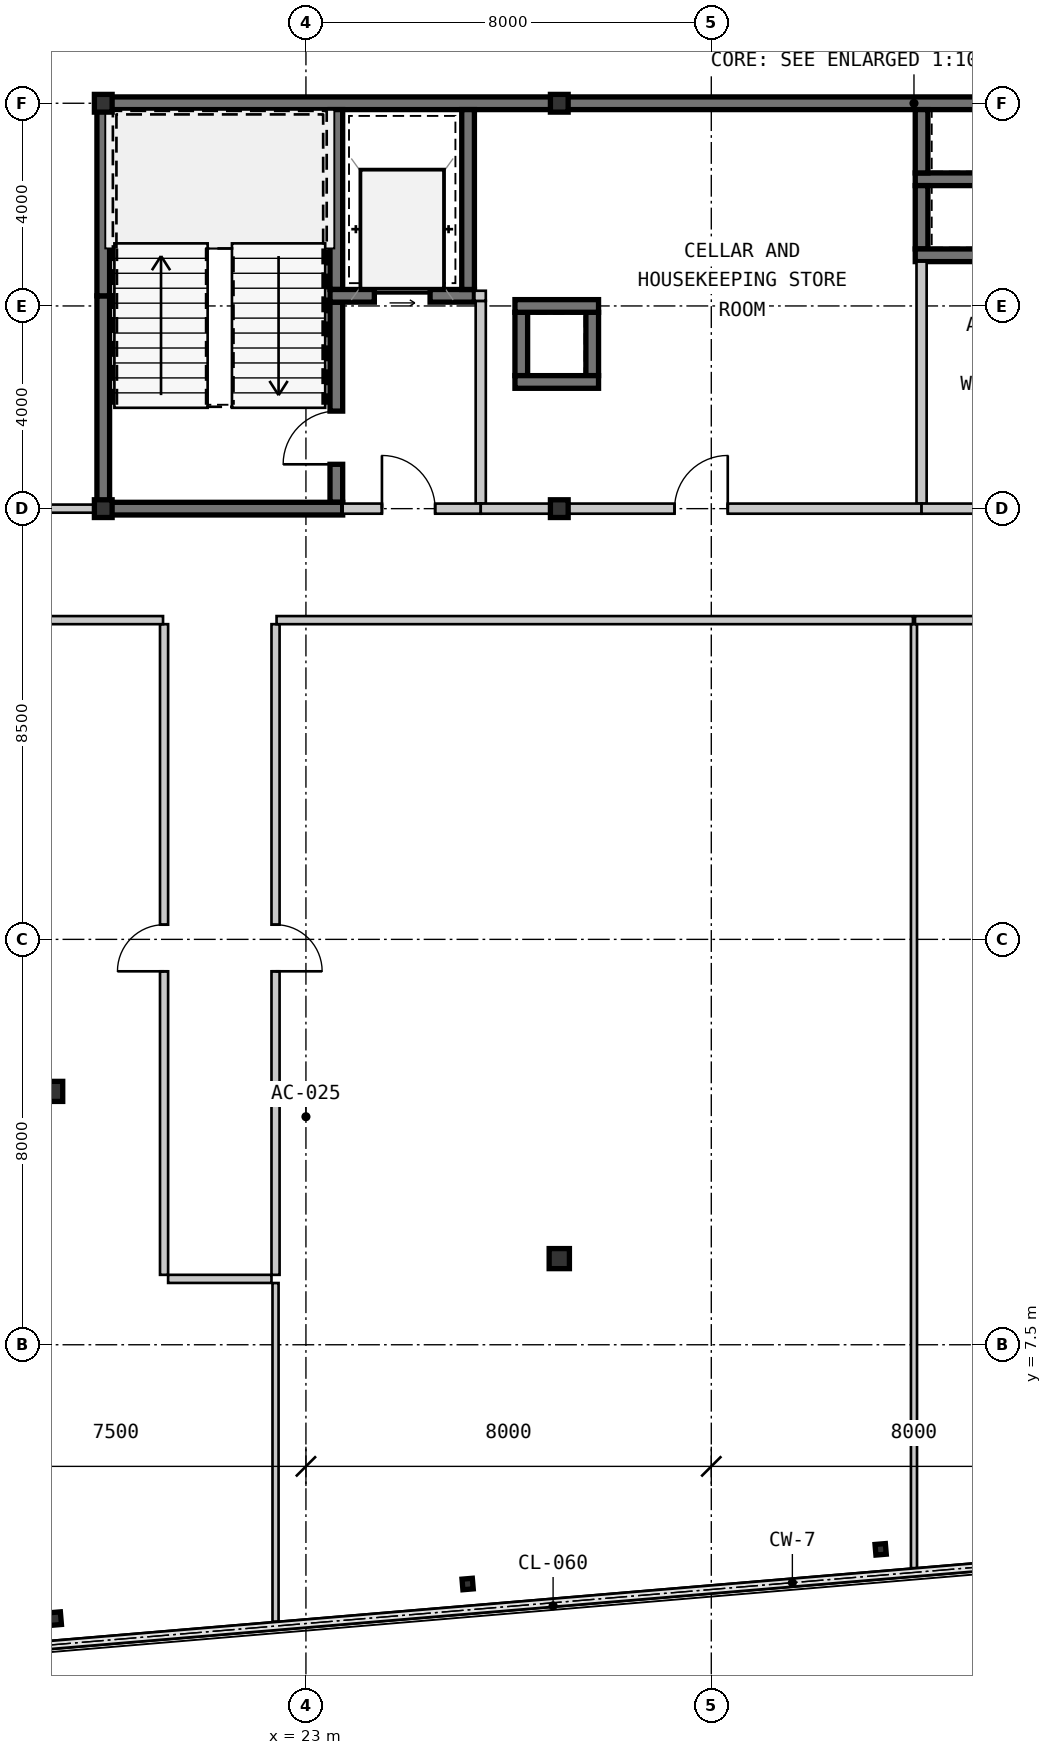
"""IFC4 building model, lengths in metres.
Left out: names, types, materials, properties, quantities, classifications, styles, units other than length and angle.
Written with IfcOpenShell. Run it as: python <this file> out.ifc"""

import sys

from ifc_helpers import new_model, si_unit, direction, frame, frame_2d, origin, origin_2d, place, context, subcontext, project, spatial, rectangle, hollow_rectangle, i_section, extrude, source, transform, mapped, element, fill, save


model = new_model("IFC4")
c1 = context("Model", 3, precision=1e-05, world=origin(), true_north=direction((0.0, 1.0)))
c2 = subcontext(c1, "Body", "Model", "MODEL_VIEW")
j1 = project(units=[si_unit("LENGTHUNIT", "METRE"), si_unit("PLANEANGLEUNIT", "RADIAN")], contexts=[c1])
p1 = place(None, origin())
s1 = spatial("IfcSite", under=j1, at=p1, CompositionType="ELEMENT")
p2 = place(p1, origin())
s2 = spatial("IfcBuilding", under=s1, at=p2, CompositionType="ELEMENT")
p3 = place(p2, frame((0.0, 0.0, 168.7)))
s3 = spatial("IfcBuildingStorey", under=s2, at=p3, CompositionType="ELEMENT", Elevation=168.7)
m1 = source(origin(), c2, "Body", "SweptSolid", [
    extrude(hollow_rectangle(XDim=0.35, YDim=0.35, WallThickness=0.016, at=origin_2d()), origin(), (0.0, 0.0, 1.0), 3.85),
])
for number, where, z_axis, x_axis in (
    (1, (19.0, 24.0, 0.0), (0.0, 0.0, 1.0), (1.0, 0.0, 0.0)),
    (2, (28.0, 24.0, 0.0), (0.0, 0.0, 1.0), (1.0, 0.0, 0.0)),
    (3, (19.0, 32.0, 0.0), (0.0, 0.0, 1.0), (1.0, 0.0, 0.0)),
    (4, (28.0, 32.0, 0.0), (0.0, 0.0, 1.0), (1.0, 0.0, 0.0)),
):
    element("IfcColumn", number, at=place(p3, frame(where, z_axis=z_axis, x_axis=x_axis)), inside=s3, PredefinedType="COLUMN", context=c2, shape_type="MappedRepresentation", body=[
        mapped(m1, transform((0.0, 0.0, 0.0), scale=1.0)),
    ])
m2 = source(origin(), c2, "Body", "SweptSolid", [
    extrude(i_section(OverallWidth=0.4, OverallDepth=0.396, WebThickness=0.022, FlangeThickness=0.034, at=origin_2d()), origin(), (0.0, 0.0, 1.0), 3.85),
])
for number, where, z_axis, x_axis in (
    (5, (28.0, 9.2, 0.0), (0.0, 0.0, 1.0), (1.0, 0.0, 0.0)),
    (6, (18.0, 12.5, 0.0), (0.0, 0.0, 1.0), (1.0, 0.0, 0.0)),
):
    element("IfcColumn", number, at=place(p3, frame(where, z_axis=z_axis, x_axis=x_axis)), inside=s3, PredefinedType="COLUMN", context=c2, shape_type="MappedRepresentation", body=[
        mapped(m2, transform((0.0, 0.0, 0.0), scale=1.0)),
    ])
m3 = source(origin(), c2, "Body", "SweptSolid", [
    extrude(hollow_rectangle(XDim=0.25, YDim=0.25, WallThickness=0.01, at=origin_2d()), origin(), (0.0, 0.0, 1.0), 3.85),
])
p4 = place(p3, frame((18.04, 2.094, 0.0), z_axis=(0.0, 0.0, 1.0), x_axis=(0.99649285925, 0.083677843332, 0.0)))
e7 = element("IfcColumn", 7, at=p4, inside=s3, PredefinedType="COLUMN", context=c2, shape_type="MappedRepresentation", body=[
    mapped(m3, transform((0.0, 0.0, 0.0), scale=1.0)),
])
m4 = source(origin(), c2, "Body", "SweptSolid", [
    extrude(i_section(OverallWidth=0.205, OverallDepth=0.21, WebThickness=0.009, FlangeThickness=0.014, at=origin_2d()), origin(), (0.0, 0.0, 1.0), 3.85),
])
for number, where, z_axis, x_axis in (
    (8, (26.191, 2.779, 0.0), (0.0, 0.0, 1.0), (0.996, 0.084, 0.0)),
    (9, (34.342, 3.463, 0.0), (0.0, 0.0, 1.0), (0.996, 0.084, 0.0)),
):
    element("IfcColumn", number, at=place(p3, frame(where, z_axis=z_axis, x_axis=x_axis)), inside=s3, PredefinedType="COLUMN", context=c2, shape_type="MappedRepresentation", body=[
        mapped(m4, transform((0.0, 0.0, 0.0), scale=1.0)),
    ])
m5 = source(origin(), c2, "Body", "SweptSolid", [
    extrude(rectangle(XDim=9.125, YDim=0.25, at=frame_2d((4.562, 0.0))), origin(), (0.0, 0.0, 1.0), 3.63),
])
p5 = place(p3, frame((18.875, 32.0, 0.0), z_axis=(0.0, 0.0, 1.0), x_axis=(1.0, 0.0, 0.0)))
e10 = element("IfcWall", 10, at=p5, inside=s3, PredefinedType="SHEAR", context=c2, shape_type="MappedRepresentation", body=[
    mapped(m5, transform((0.0, 0.0, 0.0), scale=1.0)),
])
m6 = source(origin(), c2, "Body", "SweptSolid", [
    extrude(rectangle(XDim=11.2, YDim=0.25, at=frame_2d((5.6, 0.0))), origin(), (0.0, 0.0, 1.0), 3.63),
])
p6 = place(p3, frame((28.0, 32.0, 0.0), z_axis=(0.0, 0.0, 1.0), x_axis=(1.0, 0.0, 0.0)))
e11 = element("IfcWall", 11, at=p6, inside=s3, PredefinedType="SHEAR", context=c2, shape_type="MappedRepresentation", body=[
    mapped(m6, transform((0.0, 0.0, 0.0), scale=1.0)),
])
m7 = source(origin(), c2, "Body", "SweptSolid", [
    extrude(rectangle(XDim=4.075, YDim=0.25, at=frame_2d((2.038, 0.0))), origin(), (0.0, 0.0, 1.0), 3.63),
])
p7 = place(p3, frame((19.0, 24.125, 0.0), z_axis=(0.0, 0.0, 1.0), x_axis=(0.0, 1.0, 0.0)))
e12 = element("IfcWall", 12, at=p7, inside=s3, PredefinedType="SHEAR", context=c2, shape_type="MappedRepresentation", body=[
    mapped(m7, transform((0.0, 0.0, 0.0), scale=1.0)),
])
m8 = source(origin(), c2, "Body", "SweptSolid", [
    extrude(rectangle(XDim=3.675, YDim=0.25, at=frame_2d((1.837, 0.0))), origin(), (0.0, 0.0, 1.0), 3.63),
])
p8 = place(p3, frame((19.0, 28.2, 0.0), z_axis=(0.0, 0.0, 1.0), x_axis=(0.0, 1.0, 0.0)))
e13 = element("IfcWall", 13, at=p8, inside=s3, PredefinedType="SHEAR", context=c2, shape_type="MappedRepresentation", body=[
    mapped(m8, transform((0.0, 0.0, 0.0), scale=1.0)),
])
m9 = source(origin(), c2, "Body", "SweptSolid", [
    extrude(rectangle(XDim=3.55, YDim=0.25, at=frame_2d((1.775, 0.0))), origin(), (0.0, 0.0, 1.0), 3.63),
])
p9 = place(p3, frame((23.6, 28.325, 0.0), z_axis=(0.0, 0.0, 1.0), x_axis=(0.0, 1.0, 0.0)))
e14 = element("IfcWall", 14, at=p9, inside=s3, PredefinedType="SHEAR", context=c2, shape_type="MappedRepresentation", body=[
    mapped(m9, transform((0.0, 0.0, 0.0), scale=1.0)),
])
m10 = source(origin(), c2, "Body", "SweptSolid", [
    extrude(rectangle(XDim=3.95, YDim=0.25, at=frame_2d((1.975, 0.0))), origin(), (0.0, 0.0, 1.0), 3.63),
])
p10 = place(p3, frame((23.6, 24.125, 0.0), z_axis=(0.0, 0.0, 1.0), x_axis=(0.0, 1.0, 0.0)))
e15 = element("IfcWall", 15, at=p10, inside=s3, PredefinedType="SHEAR", context=c2, shape_type="MappedRepresentation", body=[
    mapped(m10, transform((0.0, 0.0, 0.0), scale=1.0)),
])
m11 = source(origin(), c2, "Body", "SweptSolid", [
    extrude(rectangle(XDim=1.05, YDim=2.1, at=frame_2d((0.525, 1.05))), frame((0.0, 0.135, 0.0), z_axis=(0.0, -1.0, 0.0), x_axis=(1.0, 0.0, 0.0)), (0.0, 0.0, 1.0), 0.27),
])
p11 = place(p10, frame((0.75, 0.0, 0.0)))
e16 = element("IfcOpeningElement", 16, at=p11, cuts=e15, PredefinedType="OPENING", context=c2, shape_type="MappedRepresentation", body=[
    mapped(m11, transform((0.0, 0.0, 0.0), scale=1.0)),
])
m12 = source(origin(), c2, "Body", "SweptSolid", [
    extrude(rectangle(XDim=4.85, YDim=0.25, at=frame_2d((2.425, 0.0))), origin(), (0.0, 0.0, 1.0), 3.63),
])
p12 = place(p3, frame((18.875, 24.0, 0.0), z_axis=(0.0, 0.0, 1.0), x_axis=(1.0, 0.0, 0.0)))
e17 = element("IfcWall", 17, at=p12, inside=s3, PredefinedType="SHEAR", context=c2, shape_type="MappedRepresentation", body=[
    mapped(m12, transform((0.0, 0.0, 0.0), scale=1.0)),
])
m13 = source(origin(), c2, "Body", "SweptSolid", [
    extrude(rectangle(XDim=2.85, YDim=0.25, at=frame_2d((1.425, 0.0))), origin(), (0.0, 0.0, 1.0), 3.63),
])
p13 = place(p3, frame((23.475, 28.2, 0.0), z_axis=(0.0, 0.0, 1.0), x_axis=(1.0, 0.0, 0.0)))
e18 = element("IfcWall", 18, at=p13, inside=s3, PredefinedType="SHEAR", context=c2, shape_type="MappedRepresentation", body=[
    mapped(m13, transform((0.0, 0.0, 0.0), scale=1.0)),
])
m14 = source(origin(), c2, "Body", "SweptSolid", [
    extrude(rectangle(XDim=1.1, YDim=2.15, at=frame_2d((0.55, 1.075))), frame((0.0, 0.135, 0.0), z_axis=(0.0, -1.0, 0.0), x_axis=(1.0, 0.0, 0.0)), (0.0, 0.0, 1.0), 0.27),
])
p14 = place(p13, frame((0.875, 0.0, 0.0)))
e19 = element("IfcOpeningElement", 19, at=p14, cuts=e18, PredefinedType="OPENING", context=c2, shape_type="MappedRepresentation", body=[
    mapped(m14, transform((0.0, 0.0, 0.0), scale=1.0)),
])
p15 = place(p3, frame((26.2, 28.325, 0.0), z_axis=(0.0, 0.0, 1.0), x_axis=(0.0, 1.0, 0.0)))
e20 = element("IfcWall", 20, at=p15, inside=s3, PredefinedType="SHEAR", context=c2, shape_type="MappedRepresentation", body=[
    mapped(m9, transform((0.0, 0.0, 0.0), scale=1.0)),
])
m15 = source(origin(), c2, "Body", "SweptSolid", [
    extrude(rectangle(XDim=4.0, YDim=0.2, at=frame_2d((2.0, 0.0))), origin(), (0.0, 0.0, 1.0), 3.63),
])
p16 = place(p3, frame((26.45, 24.1, 0.0), z_axis=(0.0, 0.0, 1.0), x_axis=(0.0, 1.0, 0.0)))
e21 = element("IfcWall", 21, at=p16, inside=s3, PredefinedType="SOLIDWALL", context=c2, shape_type="MappedRepresentation", body=[
    mapped(m15, transform((0.0, 0.0, 0.0), scale=1.0)),
])
m16 = source(origin(), c2, "Body", "SweptSolid", [
    extrude(rectangle(XDim=2.725, YDim=0.2, at=frame_2d((1.362, 0.0))), origin(), (0.0, 0.0, 1.0), 3.17),
])
p17 = place(p3, frame((23.725, 24.0, 0.0), z_axis=(0.0, 0.0, 1.0), x_axis=(1.0, 0.0, 0.0)))
e22 = element("IfcWall", 22, at=p17, inside=s3, PredefinedType="SOLIDWALL", context=c2, shape_type="MappedRepresentation", body=[
    mapped(m16, transform((0.0, 0.0, 0.0), scale=1.0)),
])
m17 = source(origin(), c2, "Body", "SweptSolid", [
    extrude(rectangle(XDim=1.05, YDim=2.1, at=frame_2d((0.525, 1.05))), frame((0.0, 0.11, 0.0), z_axis=(0.0, -1.0, 0.0), x_axis=(1.0, 0.0, 0.0)), (0.0, 0.0, 1.0), 0.22),
])
p18 = place(p17, frame((0.775, 0.0, 0.0)))
e23 = element("IfcOpeningElement", 23, at=p18, cuts=e22, PredefinedType="OPENING", context=c2, shape_type="MappedRepresentation", body=[
    mapped(m17, transform((0.0, 0.0, 0.0), scale=1.0)),
])
m18 = source(origin(), c2, "Body", "SweptSolid", [
    extrude(rectangle(XDim=1.95, YDim=0.25, at=frame_2d((0.975, 0.0))), origin(), (0.0, 0.0, 1.0), 3.63),
])
p19 = place(p3, frame((35.025, 30.5, 0.0), z_axis=(0.0, 0.0, 1.0), x_axis=(1.0, 0.0, 0.0)))
e24 = element("IfcWall", 24, at=p19, inside=s3, PredefinedType="SHEAR", context=c2, shape_type="MappedRepresentation", body=[
    mapped(m18, transform((0.0, 0.0, 0.0), scale=1.0)),
])
m19 = source(origin(), c2, "Body", "SweptSolid", [
    extrude(rectangle(XDim=1.25, YDim=0.25, at=frame_2d((0.625, 0.0))), origin(), (0.0, 0.0, 1.0), 3.63),
])
for number, where, z_axis, x_axis in (
    (25, (35.15, 31.875, 0.0), (0.0, 0.0, 1.0), (0.0, -1.0, 0.0)),
    (26, (35.15, 30.375, 0.0), (0.0, 0.0, 1.0), (0.0, -1.0, 0.0)),
):
    element("IfcWall", number, at=place(p3, frame(where, z_axis=z_axis, x_axis=x_axis)), inside=s3, PredefinedType="SHEAR", context=c2, shape_type="MappedRepresentation", body=[
        mapped(m19, transform((0.0, 0.0, 0.0), scale=1.0)),
    ])
p20 = place(p3, frame((35.025, 29.0, 0.0), z_axis=(0.0, 0.0, 1.0), x_axis=(1.0, 0.0, 0.0)))
e27 = element("IfcWall", 27, at=p20, inside=s3, PredefinedType="SHEAR", context=c2, shape_type="MappedRepresentation", body=[
    mapped(m18, transform((0.0, 0.0, 0.0), scale=1.0)),
])
for number, where, z_axis, x_axis in (
    (28, (28.65, 26.625, 0.0), (0.0, 0.0, 1.0), (0.0, 1.0, 0.0)),
    (29, (27.25, 27.875, 0.0), (0.0, 0.0, 1.0), (0.0, -1.0, 0.0)),
):
    element("IfcWall", number, at=place(p3, frame(where, z_axis=z_axis, x_axis=x_axis)), inside=s3, PredefinedType="SHEAR", context=c2, shape_type="MappedRepresentation", body=[
        mapped(m19, transform((0.0, 0.0, 0.0), scale=1.0)),
    ])
m20 = source(origin(), c2, "Body", "SweptSolid", [
    extrude(rectangle(XDim=1.65, YDim=0.25, at=frame_2d((0.825, 0.0))), origin(), (0.0, 0.0, 1.0), 3.63),
])
for number, where, z_axis, x_axis in (
    (30, (28.775, 28.0, 0.0), (0.0, 0.0, 1.0), (-1.0, 0.0, 0.0)),
    (31, (27.125, 26.5, 0.0), (0.0, 0.0, 1.0), (1.0, 0.0, 0.0)),
):
    element("IfcWall", number, at=place(p3, frame(where, z_axis=z_axis, x_axis=x_axis)), inside=s3, PredefinedType="SHEAR", context=c2, shape_type="MappedRepresentation", body=[
        mapped(m20, transform((0.0, 0.0, 0.0), scale=1.0)),
    ])
m21 = source(origin(), c2, "Body", "SweptSolid", [
    extrude(rectangle(XDim=4.775, YDim=0.2, at=frame_2d((2.387, 0.0))), origin(), (0.0, 0.0, 1.0), 3.63),
])
p21 = place(p3, frame((35.15, 28.875, 0.0), z_axis=(0.0, 0.0, 1.0), x_axis=(0.0, -1.0, 0.0)))
e32 = element("IfcWall", 32, at=p21, inside=s3, PredefinedType="SOLIDWALL", context=c2, shape_type="MappedRepresentation", body=[
    mapped(m21, transform((0.0, 0.0, 0.0), scale=1.0)),
])
m22 = source(origin(), c2, "Body", "SweptSolid", [
    extrude(rectangle(XDim=8.7, YDim=0.2, at=frame_2d((4.35, 0.0))), origin(), (0.0, 0.0, 1.0), 3.17),
])
p22 = place(p3, frame((35.15, 24.0, 0.0), z_axis=(0.0, 0.0, 1.0), x_axis=(-1.0, 0.0, 0.0)))
e33 = element("IfcWall", 33, at=p22, inside=s3, PredefinedType="SOLIDWALL", context=c2, shape_type="MappedRepresentation", body=[
    mapped(m22, transform((0.0, 0.0, 0.0), scale=1.0)),
])
p23 = place(p22, frame((3.825, 0.0, 0.0)))
e34 = element("IfcOpeningElement", 34, at=p23, cuts=e33, PredefinedType="OPENING", context=c2, shape_type="MappedRepresentation", body=[
    mapped(m17, transform((0.0, 0.0, 0.0), scale=1.0)),
])
m23 = source(origin(), c2, "Body", "SweptSolid", [
    extrude(rectangle(XDim=4.05, YDim=0.2, at=frame_2d((2.025, 0.0))), origin(), (0.0, 0.0, 1.0), 3.17),
])
p24 = place(p3, frame((39.2, 24.0, 0.0), z_axis=(0.0, 0.0, 1.0), x_axis=(-1.0, 0.0, 0.0)))
e35 = element("IfcWall", 35, at=p24, inside=s3, PredefinedType="SOLIDWALL", context=c2, shape_type="MappedRepresentation", body=[
    mapped(m23, transform((0.0, 0.0, 0.0), scale=1.0)),
])
p25 = place(p24, frame((1.5, 0.0, 0.0)))
e36 = element("IfcOpeningElement", 36, at=p25, cuts=e35, PredefinedType="OPENING", context=c2, shape_type="MappedRepresentation", body=[
    mapped(m17, transform((0.0, 0.0, 0.0), scale=1.0)),
])
m24 = source(origin(), c2, "Body", "SweptSolid", [
    extrude(rectangle(XDim=12.84, YDim=0.16, at=frame_2d((6.42, 0.0))), origin(), (0.0, 0.0, 1.0), 3.63),
])
p26 = place(p3, frame((20.2, 8.88, 0.0), z_axis=(0.0, 0.0, 1.0), x_axis=(0.0, 1.0, 0.0)))
e37 = element("IfcWall", 37, at=p26, inside=s3, PredefinedType="PARTITIONING", context=c2, shape_type="MappedRepresentation", body=[
    mapped(m24, transform((0.0, 0.0, 0.0), scale=1.0)),
])
m25 = source(origin(), c2, "Body", "SweptSolid", [
    extrude(rectangle(XDim=0.92, YDim=2.1, at=frame_2d((0.46, 1.05))), frame((0.0, 0.09, 0.0), z_axis=(0.0, -1.0, 0.0), x_axis=(1.0, 0.0, 0.0)), (0.0, 0.0, 1.0), 0.18),
])
p27 = place(p26, frame((5.99, 0.0, 0.0)))
e38 = element("IfcOpeningElement", 38, at=p27, cuts=e37, PredefinedType="OPENING", context=c2, shape_type="MappedRepresentation", body=[
    mapped(m25, transform((0.0, 0.0, 0.0), scale=1.0)),
])
m26 = source(origin(), c2, "Body", "SweptSolid", [
    extrude(rectangle(XDim=7.384, YDim=0.16, at=frame_2d((3.692, 0.0))), origin(), (0.0, 0.0, 1.0), 3.63),
])
p28 = place(p3, frame((20.18, 21.8, 0.0), z_axis=(0.0, 0.0, 1.0), x_axis=(-1.0, 0.0, 0.0)))
e39 = element("IfcWall", 39, at=p28, inside=s3, PredefinedType="PARTITIONING", context=c2, shape_type="MappedRepresentation", body=[
    mapped(m26, transform((0.0, 0.0, 0.0), scale=1.0)),
])
m27 = source(origin(), c2, "Body", "SweptSolid", [
    extrude(rectangle(XDim=2.04, YDim=0.16, at=frame_2d((1.02, 0.0))), origin(), (0.0, 0.0, 1.0), 3.63),
])
p29 = place(p3, frame((22.32, 8.8, 0.0), z_axis=(0.0, 0.0, 1.0), x_axis=(-1.0, 0.0, 0.0)))
e40 = element("IfcWall", 40, at=p29, inside=s3, PredefinedType="PARTITIONING", context=c2, shape_type="MappedRepresentation", body=[
    mapped(m27, transform((0.0, 0.0, 0.0), scale=1.0)),
])
p30 = place(p3, frame((22.4, 21.72, 0.0), z_axis=(0.0, 0.0, 1.0), x_axis=(0.0, -1.0, 0.0)))
e41 = element("IfcWall", 41, at=p30, inside=s3, PredefinedType="PARTITIONING", context=c2, shape_type="MappedRepresentation", body=[
    mapped(m24, transform((0.0, 0.0, 0.0), scale=1.0)),
])
p31 = place(p30, frame((5.93, 0.0, 0.0)))
e42 = element("IfcOpeningElement", 42, at=p31, cuts=e41, PredefinedType="OPENING", context=c2, shape_type="MappedRepresentation", body=[
    mapped(m25, transform((0.0, 0.0, 0.0), scale=1.0)),
])
m28 = source(origin(), c2, "Body", "SweptSolid", [
    extrude(rectangle(XDim=12.559, YDim=0.16, at=frame_2d((6.28, 0.0))), origin(), (0.0, 0.0, 1.0), 3.63),
])
for number, where, z_axis, x_axis in (
    (43, (34.98, 21.8, 0.0), (0.0, 0.0, 1.0), (-1.0, 0.0, 0.0)),
    (44, (47.58, 21.8, 0.0), (0.0, 0.0, 1.0), (-1.0, 0.0, 0.0)),
):
    element("IfcWall", number, at=place(p3, frame(where, z_axis=z_axis, x_axis=x_axis)), inside=s3, PredefinedType="PARTITIONING", context=c2, shape_type="MappedRepresentation", body=[
        mapped(m28, transform((0.0, 0.0, 0.0), scale=1.0)),
    ])
m29 = source(origin(), c2, "Body", "SweptSolid", [
    extrude(rectangle(XDim=6.251, YDim=0.16, at=frame_2d((3.125, 0.0))), origin(), (0.0, 0.0, 1.0), 3.63),
])
p32 = place(p3, frame((12.624, 24.0, 0.0), z_axis=(0.0, 0.0, 1.0), x_axis=(1.0, 0.0, 0.0)))
e45 = element("IfcWall", 45, at=p32, inside=s3, PredefinedType="PARTITIONING", context=c2, shape_type="MappedRepresentation", body=[
    mapped(m29, transform((0.0, 0.0, 0.0), scale=1.0)),
])
m30 = source(origin(), c2, "Body", "SweptSolid", [
    extrude(rectangle(XDim=6.684, YDim=0.12, at=frame_2d((3.342, 0.0))), origin(), (0.0, 0.0, 1.0), 3.63),
])
p33 = place(p3, frame((22.4, 8.718, 0.0), z_axis=(0.0, 0.0, 1.0), x_axis=(0.0, -1.0, 0.0)))
e46 = element("IfcWall", 46, at=p33, inside=s3, PredefinedType="PARTITIONING", context=c2, shape_type="MappedRepresentation", body=[
    mapped(m30, transform((0.0, 0.0, 0.0), scale=1.0)),
])
m31 = source(origin(), c2, "Body", "SweptSolid", [
    extrude(rectangle(XDim=18.626, YDim=0.12, at=frame_2d((9.313, 0.0))), origin(), (0.0, 0.0, 1.0), 3.63),
])
p34 = place(p3, frame((35.0, 21.718, 0.0), z_axis=(0.0, 0.0, 1.0), x_axis=(0.0, -1.0, 0.0)))
e47 = element("IfcWall", 47, at=p34, inside=s3, PredefinedType="PARTITIONING", context=c2, shape_type="MappedRepresentation", body=[
    mapped(m31, transform((0.0, 0.0, 0.0), scale=1.0)),
])
m32 = source(origin(), c2, "Body", "SweptSolid", [
    extrude(rectangle(XDim=0.225, YDim=0.2, at=frame_2d((0.113, 0.0))), origin(), (0.0, 0.0, 1.0), 3.63),
])
p35 = place(p3, frame((26.325, 28.2, 0.0), z_axis=(0.0, 0.0, 1.0), x_axis=(1.0, 0.0, 0.0)))
e48 = element("IfcWall", 48, at=p35, inside=s3, PredefinedType="SOLIDWALL", context=c2, shape_type="MappedRepresentation", body=[
    mapped(m32, transform((0.0, 0.0, 0.0), scale=1.0)),
])
m33 = source(origin(), c2, "Body", "SweptSolid", [
    extrude(rectangle(XDim=1.05, YDim=2.1, at=frame_2d((0.525, 1.05))), frame((0.0, 0.025, 0.0), z_axis=(0.0, -1.0, 0.0), x_axis=(1.0, 0.0, 0.0)), (0.0, 0.0, 1.0), 0.05),
])
p36 = place(p11, origin())
e49 = element("IfcDoor", 49, at=p36, inside=s3, OperationType="SINGLE_SWING_LEFT", PredefinedType="DOOR", context=c2, shape_type="MappedRepresentation", body=[
    mapped(m33, transform((0.0, 0.0, 0.0), scale=1.0)),
])
fill(e16, e49)
m34 = source(origin(), c2, "Body", "SweptSolid", [
    extrude(rectangle(XDim=1.1, YDim=2.15, at=frame_2d((0.55, 1.075))), frame((0.0, 0.025, 0.0), z_axis=(0.0, -1.0, 0.0), x_axis=(1.0, 0.0, 0.0)), (0.0, 0.0, 1.0), 0.05),
])
p37 = place(p14, origin())
e50 = element("IfcDoor", 50, at=p37, inside=s3, OperationType="SLIDING_TO_LEFT", PredefinedType="DOOR", context=c2, shape_type="MappedRepresentation", body=[
    mapped(m34, transform((0.0, 0.0, 0.0), scale=1.0)),
])
fill(e19, e50)
p38 = place(p18, origin())
e51 = element("IfcDoor", 51, at=p38, inside=s3, OperationType="SINGLE_SWING_LEFT", PredefinedType="DOOR", context=c2, shape_type="MappedRepresentation", body=[
    mapped(m33, transform((0.0, 0.0, 0.0), scale=1.0)),
])
fill(e23, e51)
p39 = place(p23, frame((1.05, 0.0, 0.0), z_axis=(0.0, 0.0, 1.0), x_axis=(-1.0, 0.0, 0.0)))
e52 = element("IfcDoor", 52, at=p39, inside=s3, OperationType="SINGLE_SWING_RIGHT", PredefinedType="DOOR", context=c2, shape_type="MappedRepresentation", body=[
    mapped(m33, transform((0.0, 0.0, 0.0), scale=1.0)),
])
fill(e34, e52)
m35 = source(origin(), c2, "Body", "SweptSolid", [
    extrude(rectangle(XDim=0.92, YDim=2.1, at=frame_2d((0.46, 1.05))), frame((0.0, 0.025, 0.0), z_axis=(0.0, -1.0, 0.0), x_axis=(1.0, 0.0, 0.0)), (0.0, 0.0, 1.0), 0.05),
])
p40 = place(p27, origin())
e53 = element("IfcDoor", 53, at=p40, inside=s3, OperationType="SINGLE_SWING_LEFT", PredefinedType="DOOR", context=c2, shape_type="MappedRepresentation", body=[
    mapped(m35, transform((0.0, 0.0, 0.0), scale=1.0)),
])
fill(e38, e53)
p41 = place(p31, origin())
e54 = element("IfcDoor", 54, at=p41, inside=s3, OperationType="SINGLE_SWING_RIGHT", PredefinedType="DOOR", context=c2, shape_type="MappedRepresentation", body=[
    mapped(m35, transform((0.0, 0.0, 0.0), scale=1.0)),
])
fill(e42, e54)
save(model, sys.argv[1])
